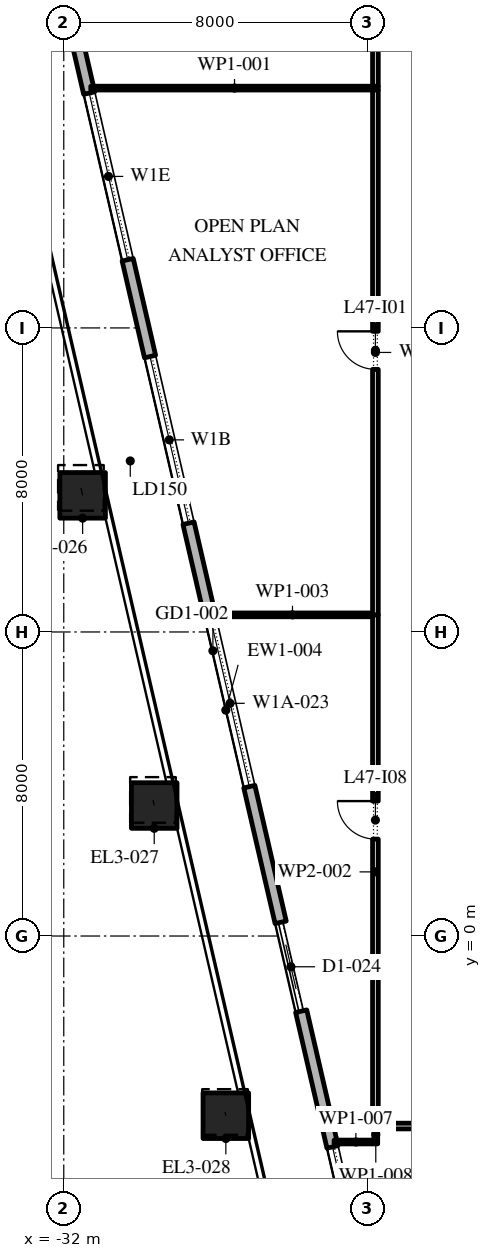
"""IFC4 building model, lengths in metres.
Left out: names, types, materials, properties, quantities, classifications, styles, units other than length and angle.
Written with IfcOpenShell. Run it as: python <this file> out.ifc"""

import sys

from ifc_helpers import new_model, si_unit, direction, frame, frame_2d, origin, origin_2d, place, context, subcontext, project, spatial, rectangle, extrude, element, fill, save


model = new_model("IFC4")
c1 = context("Model", 3, precision=1e-05, world=origin(), true_north=direction((0.0, 1.0)))
c2 = subcontext(c1, "Body", "Model", "MODEL_VIEW")
j1 = project(units=[si_unit("LENGTHUNIT", "METRE"), si_unit("PLANEANGLEUNIT", "RADIAN")], contexts=[c1])
p1 = place(None, origin())
s1 = spatial("IfcSite", under=j1, at=p1, CompositionType="ELEMENT")
p2 = place(p1, origin())
s2 = spatial("IfcBuilding", under=s1, at=p2, CompositionType="ELEMENT")
p3 = place(p2, frame((0.0, 0.0, 213.6)))
s3 = spatial("IfcBuildingStorey", under=s2, at=p3, CompositionType="ELEMENT", Elevation=213.6)
p4 = place(p3, frame((-31.504, 11.595, 0.0), z_axis=(-0.010799619665, 0.046740289408, 0.998848694028), x_axis=(-0.974329962248, -0.225124686929, 0.0)))
e1 = element("IfcColumn", 1, at=p4, inside=s3, PredefinedType="COLUMN", context=c2, shape_type="SweptSolid", body=[
    extrude(rectangle(XDim=1.2, YDim=1.2, at=origin_2d()), origin(), (0.0, 0.0, 1.0), 4.205),
])
p5 = place(p3, frame((-29.62, 3.433, 0.0), z_axis=(-0.0080747472, 0.035087390713, 0.999351626541), x_axis=(-0.974526982896, -0.224270282488, 0.0)))
e2 = element("IfcColumn", 2, at=p5, inside=s3, PredefinedType="COLUMN", context=c2, shape_type="SweptSolid", body=[
    extrude(rectangle(XDim=1.2, YDim=1.2, at=origin_2d()), origin(), (0.0, 0.0, 1.0), 4.203),
])
p6 = place(p3, frame((-27.735, -4.728, 0.0), z_axis=(-0.005404472139, 0.023419379268, 0.999711120452), x_axis=(-0.974391195695, -0.224859506699, 0.0)))
e3 = element("IfcColumn", 3, at=p6, inside=s3, PredefinedType="COLUMN", context=c2, shape_type="SweptSolid", body=[
    extrude(rectangle(XDim=1.2, YDim=1.2, at=origin_2d()), origin(), (0.0, 0.0, 1.0), 4.201),
])
p7 = place(p3, frame((-33.157, 30.092, 0.0), z_axis=(0.0, 0.0, 1.0), x_axis=(0.224950279389, -0.974370243697, 0.0)))
e4 = element("IfcWall", 4, at=p7, inside=s3, PredefinedType="STANDARD", context=c2, shape_type="SweptSolid", body=[
    extrude(rectangle(XDim=49.5, YDim=0.3, at=frame_2d((24.75, 0.0))), origin(), (0.0, 0.0, 1.0), 4.0),
])
p8 = place(p7, frame((2.207, 0.0, 0.0)))
e5 = element("IfcOpeningElement", 5, at=p8, cuts=e4, PredefinedType="OPENING", context=c2, shape_type="SweptSolid", body=[
    extrude(rectangle(XDim=2.4, YDim=3.5, at=frame_2d((1.2, 1.75))), frame((0.0, 0.16, 0.0), z_axis=(0.0, -1.0, 0.0), x_axis=(1.0, 0.0, 0.0)), (0.0, 0.0, 1.0), 0.32),
])
p9 = place(p7, frame((8.121, 0.0, 0.45)))
e6 = element("IfcOpeningElement", 6, at=p9, cuts=e4, PredefinedType="OPENING", context=c2, shape_type="SweptSolid", body=[
    extrude(rectangle(XDim=4.5, YDim=2.825, at=frame_2d((2.25, 1.413))), frame((0.0, 0.16, 0.0), z_axis=(0.0, -1.0, 0.0), x_axis=(1.0, 0.0, 0.0)), (0.0, 0.0, 1.0), 0.32),
])
p10 = place(p7, frame((15.236, 0.0, 0.45)))
e7 = element("IfcOpeningElement", 7, at=p10, cuts=e4, PredefinedType="OPENING", context=c2, shape_type="SweptSolid", body=[
    extrude(rectangle(XDim=4.5, YDim=2.95, at=frame_2d((2.25, 1.475))), frame((0.0, 0.16, 0.0), z_axis=(0.0, -1.0, 0.0), x_axis=(1.0, 0.0, 0.0)), (0.0, 0.0, 1.0), 0.32),
])
p11 = place(p7, frame((22.35, 0.0, 0.45)))
e8 = element("IfcOpeningElement", 8, at=p11, cuts=e4, PredefinedType="OPENING", context=c2, shape_type="SweptSolid", body=[
    extrude(rectangle(XDim=4.5, YDim=3.0, at=frame_2d((2.25, 1.5))), frame((0.0, 0.16, 0.0), z_axis=(0.0, -1.0, 0.0), x_axis=(1.0, 0.0, 0.0)), (0.0, 0.0, 1.0), 0.32),
])
p12 = place(p7, frame((30.514, 0.0, 0.0)))
e9 = element("IfcOpeningElement", 9, at=p12, cuts=e4, PredefinedType="OPENING", context=c2, shape_type="SweptSolid", body=[
    extrude(rectangle(XDim=2.4, YDim=3.5, at=frame_2d((1.2, 1.75))), frame((0.0, 0.16, 0.0), z_axis=(0.0, -1.0, 0.0), x_axis=(1.0, 0.0, 0.0)), (0.0, 0.0, 1.0), 0.32),
])
p13 = place(p7, frame((36.579, 0.0, 0.45)))
e10 = element("IfcOpeningElement", 10, at=p13, cuts=e4, PredefinedType="OPENING", context=c2, shape_type="SweptSolid", body=[
    extrude(rectangle(XDim=4.5, YDim=3.05, at=frame_2d((2.25, 1.525))), frame((0.0, 0.16, 0.0), z_axis=(0.0, -1.0, 0.0), x_axis=(1.0, 0.0, 0.0)), (0.0, 0.0, 1.0), 0.32),
])
p14 = place(p7, frame((43.693, 0.0, 0.45)))
e11 = element("IfcOpeningElement", 11, at=p14, cuts=e4, PredefinedType="OPENING", context=c2, shape_type="SweptSolid", body=[
    extrude(rectangle(XDim=4.5, YDim=3.05, at=frame_2d((2.25, 1.525))), frame((0.0, 0.16, 0.0), z_axis=(0.0, -1.0, 0.0), x_axis=(1.0, 0.0, 0.0)), (0.0, 0.0, 1.0), 0.32),
])
p15 = place(p3, frame((-31.289, 22.31, 0.0), z_axis=(0.0, 0.0, 1.0), x_axis=(1.0, 0.0, 0.0)))
e12 = element("IfcWall", 12, at=p15, inside=s3, PredefinedType="PARTITIONING", context=c2, shape_type="SweptSolid", body=[
    extrude(rectangle(XDim=7.564, YDim=0.1, at=frame_2d((3.782, 0.0))), origin(), (0.0, 0.0, 1.0), 4.0),
])
p16 = place(p3, frame((-23.8, -5.075, 0.0), z_axis=(0.0, 0.0, 1.0), x_axis=(0.0, 1.0, 0.0)))
e13 = element("IfcWall", 13, at=p16, inside=s3, PredefinedType="PARTITIONING", context=c2, shape_type="SweptSolid", body=[
    extrude(rectangle(XDim=13.525, YDim=0.15, at=frame_2d((6.762, 0.0))), origin(), (0.0, 0.0, 1.0), 4.0),
])
p17 = place(p16, frame((7.625, 0.0, 0.0)))
e14 = element("IfcOpeningElement", 14, at=p17, cuts=e13, PredefinedType="OPENING", context=c2, shape_type="SweptSolid", body=[
    extrude(rectangle(XDim=1.0, YDim=2.1, at=frame_2d((0.5, 1.05))), frame((0.0, 0.085, 0.0), z_axis=(0.0, -1.0, 0.0), x_axis=(1.0, 0.0, 0.0)), (0.0, 0.0, 1.0), 0.17),
])
p18 = place(p3, frame((-23.875, 8.45, 0.0), z_axis=(0.0, 0.0, 1.0), x_axis=(-1.0, 0.0, 0.0)))
e15 = element("IfcWall", 15, at=p18, inside=s3, PredefinedType="PARTITIONING", context=c2, shape_type="SweptSolid", body=[
    extrude(rectangle(XDim=4.214, YDim=0.1, at=frame_2d((2.107, 0.0))), origin(), (0.0, 0.0, 1.0), 4.0),
])
p19 = place(p3, frame((-23.8, 8.45, 0.0), z_axis=(0.0, 0.0, 1.0), x_axis=(0.0, 1.0, 0.0)))
e16 = element("IfcWall", 16, at=p19, inside=s3, PredefinedType="PARTITIONING", context=c2, shape_type="SweptSolid", body=[
    extrude(rectangle(XDim=13.81, YDim=0.15, at=frame_2d((6.905, 0.0))), origin(), (0.0, 0.0, 1.0), 4.0),
])
p20 = place(p19, frame((6.46, 0.0, 0.0)))
e17 = element("IfcOpeningElement", 17, at=p20, cuts=e16, PredefinedType="OPENING", context=c2, shape_type="SweptSolid", body=[
    extrude(rectangle(XDim=1.0, YDim=2.1, at=frame_2d((0.5, 1.05))), frame((0.0, 0.085, 0.0), z_axis=(0.0, -1.0, 0.0), x_axis=(1.0, 0.0, 0.0)), (0.0, 0.0, 1.0), 0.17),
])
p21 = place(p3, frame((-23.8, 22.36, 0.0), z_axis=(0.0, 0.0, 1.0), x_axis=(0.0, 1.0, 0.0)))
e18 = element("IfcWall", 18, at=p21, inside=s3, PredefinedType="PARTITIONING", context=c2, shape_type="SweptSolid", body=[
    extrude(rectangle(XDim=4.915, YDim=0.15, at=frame_2d((2.458, 0.0))), origin(), (0.0, 0.0, 1.0), 4.0),
])
p22 = place(p21, frame((2.44, 0.0, 0.0)))
e19 = element("IfcOpeningElement", 19, at=p22, cuts=e18, PredefinedType="OPENING", context=c2, shape_type="SweptSolid", body=[
    extrude(rectangle(XDim=1.0, YDim=2.1, at=frame_2d((0.5, 1.05))), frame((0.0, 0.085, 0.0), z_axis=(0.0, -1.0, 0.0), x_axis=(1.0, 0.0, 0.0)), (0.0, 0.0, 1.0), 0.17),
])
p23 = place(p3, frame((-23.74, -5.42, 0.0), z_axis=(0.0, 0.0, 1.0), x_axis=(-1.0, 0.0, 0.0)))
e20 = element("IfcWall", 20, at=p23, inside=s3, PredefinedType="PARTITIONING", context=c2, shape_type="SweptSolid", body=[
    extrude(rectangle(XDim=1.147, YDim=0.1, at=frame_2d((0.573, 0.0))), origin(), (0.0, 0.0, 1.0), 4.0),
])
p24 = place(p3, frame((-23.79, -5.075, 0.0), z_axis=(0.0, 0.0, 1.0), x_axis=(0.0, -1.0, 0.0)))
e21 = element("IfcWall", 21, at=p24, inside=s3, PredefinedType="PARTITIONING", context=c2, shape_type="SweptSolid", body=[
    extrude(rectangle(XDim=0.295, YDim=0.1, at=frame_2d((0.147, 0.0))), origin(), (0.0, 0.0, 1.0), 4.0),
])
p25 = place(p3, frame((-10.0, -5.0, 0.0), z_axis=(0.0, 0.0, 1.0), x_axis=(-1.0, 0.0, 0.0)))
e22 = element("IfcWall", 22, at=p25, inside=s3, PredefinedType="PARTITIONING", context=c2, shape_type="SweptSolid", body=[
    extrude(rectangle(XDim=13.715, YDim=0.15, at=frame_2d((6.857, 0.0))), origin(), (0.0, 0.0, 1.0), 4.0),
])
p26 = place(p25, frame((3.64, 0.0, 0.0)))
e23 = element("IfcOpeningElement", 23, at=p26, cuts=e22, PredefinedType="OPENING", context=c2, shape_type="SweptSolid", body=[
    extrude(rectangle(XDim=1.0, YDim=2.1, at=frame_2d((0.5, 1.05))), frame((0.0, 0.085, 0.0), z_axis=(0.0, -1.0, 0.0), x_axis=(1.0, 0.0, 0.0)), (0.0, 0.0, 1.0), 0.17),
])
p27 = place(p9, origin())
e24 = element("IfcWindow", 24, at=p27, inside=s3, PartitioningType="DOUBLE_PANEL_VERTICAL", PredefinedType="WINDOW", context=c2, shape_type="SweptSolid", body=[
    extrude(rectangle(XDim=4.5, YDim=2.825, at=frame_2d((2.25, 1.413))), frame((0.0, 0.03, 0.0), z_axis=(0.0, -1.0, 0.0), x_axis=(1.0, 0.0, 0.0)), (0.0, 0.0, 1.0), 0.06),
])
fill(e6, e24)
p28 = place(p10, origin())
e25 = element("IfcWindow", 25, at=p28, inside=s3, PartitioningType="DOUBLE_PANEL_VERTICAL", PredefinedType="WINDOW", context=c2, shape_type="SweptSolid", body=[
    extrude(rectangle(XDim=4.5, YDim=2.95, at=frame_2d((2.25, 1.475))), frame((0.0, 0.03, 0.0), z_axis=(0.0, -1.0, 0.0), x_axis=(1.0, 0.0, 0.0)), (0.0, 0.0, 1.0), 0.06),
])
fill(e7, e25)
p29 = place(p11, origin())
e26 = element("IfcWindow", 26, at=p29, inside=s3, PartitioningType="DOUBLE_PANEL_VERTICAL", PredefinedType="WINDOW", context=c2, shape_type="SweptSolid", body=[
    extrude(rectangle(XDim=4.5, YDim=3.0, at=frame_2d((2.25, 1.5))), frame((0.0, 0.03, 0.0), z_axis=(0.0, -1.0, 0.0), x_axis=(1.0, 0.0, 0.0)), (0.0, 0.0, 1.0), 0.06),
])
fill(e8, e26)
p30 = place(p12, origin())
e27 = element("IfcDoor", 27, at=p30, inside=s3, OperationType="DOUBLE_DOOR_SLIDING", PredefinedType="DOOR", context=c2, shape_type="SweptSolid", body=[
    extrude(rectangle(XDim=2.4, YDim=3.5, at=frame_2d((1.2, 1.75))), frame((0.0, 0.025, 0.0), z_axis=(0.0, -1.0, 0.0), x_axis=(1.0, 0.0, 0.0)), (0.0, 0.0, 1.0), 0.05),
])
fill(e9, e27)
p31 = place(p13, origin())
e28 = element("IfcWindow", 28, at=p31, inside=s3, PartitioningType="DOUBLE_PANEL_VERTICAL", PredefinedType="WINDOW", context=c2, shape_type="SweptSolid", body=[
    extrude(rectangle(XDim=4.5, YDim=3.05, at=frame_2d((2.25, 1.525))), frame((0.0, 0.03, 0.0), z_axis=(0.0, -1.0, 0.0), x_axis=(1.0, 0.0, 0.0)), (0.0, 0.0, 1.0), 0.06),
])
fill(e10, e28)
p32 = place(p20, origin())
e29 = element("IfcDoor", 29, at=p32, inside=s3, OperationType="SINGLE_SWING_LEFT", PredefinedType="DOOR", context=c2, shape_type="SweptSolid", body=[
    extrude(rectangle(XDim=1.0, YDim=2.1, at=frame_2d((0.5, 1.05))), frame((0.0, 0.025, 0.0), z_axis=(0.0, -1.0, 0.0), x_axis=(1.0, 0.0, 0.0)), (0.0, 0.0, 1.0), 0.05),
])
fill(e17, e29)
p33 = place(p17, origin())
e30 = element("IfcDoor", 30, at=p33, inside=s3, OperationType="SINGLE_SWING_LEFT", PredefinedType="DOOR", context=c2, shape_type="SweptSolid", body=[
    extrude(rectangle(XDim=1.0, YDim=2.1, at=frame_2d((0.5, 1.05))), frame((0.0, 0.025, 0.0), z_axis=(0.0, -1.0, 0.0), x_axis=(1.0, 0.0, 0.0)), (0.0, 0.0, 1.0), 0.05),
])
fill(e14, e30)
save(model, sys.argv[1])
